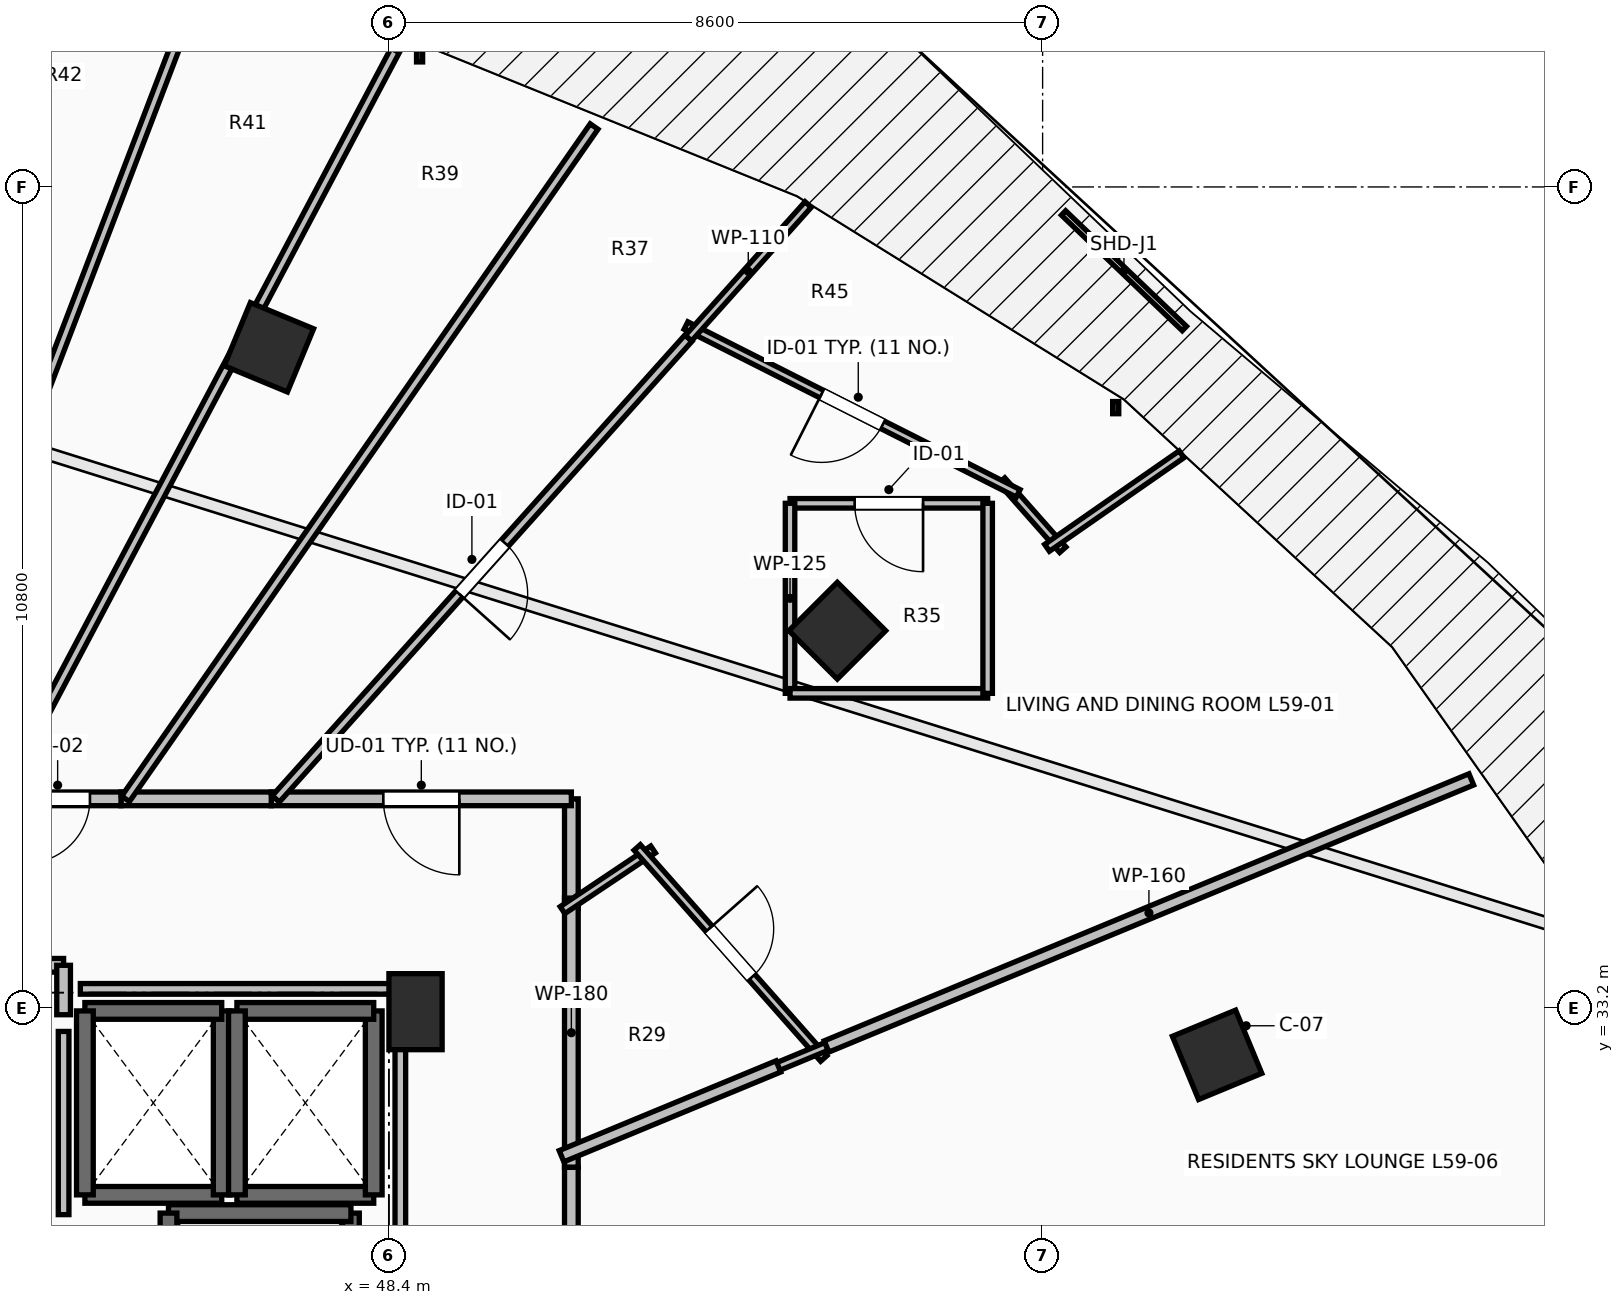
"""IFC4 building model, lengths in metres.
Left out: names, types, materials, properties, quantities, classifications, styles, units other than length and angle.
Written with IfcOpenShell. Run it as: python <this file> out.ifc"""

import sys

from ifc_helpers import new_model, si_unit, direction, frame, frame_2d, origin, origin_2d, place, context, subcontext, project, spatial, rectangle, extrude, element, fill, save


model = new_model("IFC4")
c1 = context("Model", 3, precision=1e-05, world=origin(), true_north=direction((0.0, 1.0)))
c2 = subcontext(c1, "Body", "Model", "MODEL_VIEW")
j1 = project(units=[si_unit("LENGTHUNIT", "METRE"), si_unit("PLANEANGLEUNIT", "RADIAN")], contexts=[c1])
p1 = place(None, origin())
s1 = spatial("IfcSite", under=j1, at=p1, CompositionType="ELEMENT")
p2 = place(p1, origin())
s2 = spatial("IfcBuilding", under=s1, at=p2, CompositionType="ELEMENT")
p3 = place(p2, frame((0.0, 0.0, 217.85)))
s3 = spatial("IfcBuildingStorey", under=s2, at=p3, CompositionType="ELEMENT", Elevation=217.85)
for number, where, z_axis, x_axis in (
    (1, (59.295, 32.582, 0.0), (0.0, 0.0, 1.0), (0.924, 0.383, 0.0)),
    (2, (54.299, 38.162, 0.0), (0.0, 0.0, 1.0), (0.707, 0.707, 0.0)),
    (3, (46.821, 41.891, 0.0), (0.0, 0.0, 1.0), (0.383, 0.924, 0.0)),
):
    element("IfcColumn", number, at=place(p3, frame(where, z_axis=z_axis, x_axis=x_axis)), inside=s3, PredefinedType="COLUMN", context=c2, shape_type="SweptSolid", body=[
        extrude(rectangle(XDim=0.9, YDim=0.9, at=origin_2d()), origin(), (0.0, 0.0, 1.0), 3.55),
    ])
p4 = place(p3, frame((48.75, 33.15, 0.0), z_axis=(0.0, 0.0, 1.0), x_axis=(1.0, 0.0, 0.0)))
e4 = element("IfcColumn", 4, at=p4, inside=s3, PredefinedType="PILASTER", context=c2, shape_type="SweptSolid", body=[
    extrude(rectangle(XDim=0.7, YDim=1.0, at=origin_2d()), origin(), (0.0, 0.0, 1.0), 3.55),
])
p5 = place(p3, frame((44.4, 30.74, 0.0), z_axis=(0.0, 0.0, 1.0), x_axis=(1.0, 0.0, 0.0)))
e5 = element("IfcWall", 5, at=p5, inside=s3, PredefinedType="SOLIDWALL", context=c2, shape_type="SweptSolid", body=[
    extrude(rectangle(XDim=1.8, YDim=0.22, at=frame_2d((0.9, 0.0))), origin(), (0.0, 0.0, 1.0), 3.29),
])
p6 = place(p3, frame((46.2, 30.74, 0.0), z_axis=(0.0, 0.0, 1.0), x_axis=(0.0, 1.0, 0.0)))
e6 = element("IfcWall", 6, at=p6, inside=s3, PredefinedType="SOLIDWALL", context=c2, shape_type="SweptSolid", body=[
    extrude(rectangle(XDim=2.42, YDim=0.22, at=frame_2d((1.21, 0.0))), origin(), (0.0, 0.0, 1.0), 3.29),
])
p7 = place(p3, frame((46.2, 33.16, 0.0), z_axis=(0.0, 0.0, 1.0), x_axis=(-1.0, 0.0, 0.0)))
e7 = element("IfcWall", 7, at=p7, inside=s3, PredefinedType="SOLIDWALL", context=c2, shape_type="SweptSolid", body=[
    extrude(rectangle(XDim=1.8, YDim=0.22, at=frame_2d((0.9, 0.0))), origin(), (0.0, 0.0, 1.0), 3.29),
])
p8 = place(p3, frame((44.4, 33.16, 0.0), z_axis=(0.0, 0.0, 1.0), x_axis=(0.0, -1.0, 0.0)))
e8 = element("IfcWall", 8, at=p8, inside=s3, PredefinedType="SOLIDWALL", context=c2, shape_type="SweptSolid", body=[
    extrude(rectangle(XDim=2.42, YDim=0.22, at=frame_2d((1.21, 0.0))), origin(), (0.0, 0.0, 1.0), 3.29),
])
p9 = place(p3, frame((46.4, 30.74, 0.0), z_axis=(0.0, 0.0, 1.0), x_axis=(1.0, 0.0, 0.0)))
e9 = element("IfcWall", 9, at=p9, inside=s3, PredefinedType="SOLIDWALL", context=c2, shape_type="SweptSolid", body=[
    extrude(rectangle(XDim=1.8, YDim=0.22, at=frame_2d((0.9, 0.0))), origin(), (0.0, 0.0, 1.0), 3.29),
])
p10 = place(p3, frame((48.2, 30.74, 0.0), z_axis=(0.0, 0.0, 1.0), x_axis=(0.0, 1.0, 0.0)))
e10 = element("IfcWall", 10, at=p10, inside=s3, PredefinedType="SOLIDWALL", context=c2, shape_type="SweptSolid", body=[
    extrude(rectangle(XDim=2.42, YDim=0.22, at=frame_2d((1.21, 0.0))), origin(), (0.0, 0.0, 1.0), 3.29),
])
p11 = place(p3, frame((48.2, 33.16, 0.0), z_axis=(0.0, 0.0, 1.0), x_axis=(-1.0, 0.0, 0.0)))
e11 = element("IfcWall", 11, at=p11, inside=s3, PredefinedType="SOLIDWALL", context=c2, shape_type="SweptSolid", body=[
    extrude(rectangle(XDim=1.8, YDim=0.22, at=frame_2d((0.9, 0.0))), origin(), (0.0, 0.0, 1.0), 3.29),
])
p12 = place(p3, frame((46.4, 33.16, 0.0), z_axis=(0.0, 0.0, 1.0), x_axis=(0.0, -1.0, 0.0)))
e12 = element("IfcWall", 12, at=p12, inside=s3, PredefinedType="SOLIDWALL", context=c2, shape_type="SweptSolid", body=[
    extrude(rectangle(XDim=2.42, YDim=0.22, at=frame_2d((1.21, 0.0))), origin(), (0.0, 0.0, 1.0), 3.29),
])
p13 = place(p3, frame((47.9, 28.0, 0.0), z_axis=(0.0, 0.0, 1.0), x_axis=(0.0, 1.0, 0.0)))
e13 = element("IfcWall", 13, at=p13, inside=s3, PredefinedType="SHEAR", context=c2, shape_type="SweptSolid", body=[
    extrude(rectangle(XDim=2.5, YDim=0.22, at=frame_2d((1.25, 0.0))), origin(), (0.0, 0.0, 1.0), 3.29),
])
p14 = place(p3, frame((47.9, 30.5, 0.0), z_axis=(0.0, 0.0, 1.0), x_axis=(-1.0, 0.0, 0.0)))
e14 = element("IfcWall", 14, at=p14, inside=s3, PredefinedType="SHEAR", context=c2, shape_type="SweptSolid", body=[
    extrude(rectangle(XDim=2.4, YDim=0.22, at=frame_2d((1.2, 0.0))), origin(), (0.0, 0.0, 1.0), 3.29),
])
p15 = place(p3, frame((45.5, 30.5, 0.0), z_axis=(0.0, 0.0, 1.0), x_axis=(0.0, -1.0, 0.0)))
e15 = element("IfcWall", 15, at=p15, inside=s3, PredefinedType="SHEAR", context=c2, shape_type="SweptSolid", body=[
    extrude(rectangle(XDim=2.5, YDim=0.22, at=frame_2d((1.25, 0.0))), origin(), (0.0, 0.0, 1.0), 3.29),
])
p16 = place(p3, frame((44.12, 33.76, 0.0), z_axis=(0.0, 0.0, 1.0), x_axis=(-1.0, 0.0, 0.0)))
e16 = element("IfcWall", 16, at=p16, inside=s3, PredefinedType="PARTITIONING", context=c2, shape_type="SweptSolid", body=[
    extrude(rectangle(XDim=2.53, YDim=0.18, at=frame_2d((1.265, 0.0))), origin(), (0.0, 0.0, 1.0), 3.29),
])
p17 = place(p16, frame((0.84, 0.0, 0.0)))
e17 = element("IfcOpeningElement", 17, at=p17, cuts=e16, PredefinedType="OPENING", context=c2, shape_type="SweptSolid", body=[
    extrude(rectangle(XDim=0.85, YDim=2.1, at=frame_2d((0.425, 1.05))), frame((0.0, 0.105, 0.0), z_axis=(0.0, -1.0, 0.0), x_axis=(1.0, 0.0, 0.0)), (0.0, 0.0, 1.0), 0.21),
])
p18 = place(p3, frame((44.12, 33.11, 0.0), z_axis=(0.0, 0.0, 1.0), x_axis=(0.0, 1.0, 0.0)))
e18 = element("IfcWall", 18, at=p18, inside=s3, PredefinedType="PARTITIONING", context=c2, shape_type="SweptSolid", body=[
    extrude(rectangle(XDim=0.65, YDim=0.18, at=frame_2d((0.325, 0.0))), origin(), (0.0, 0.0, 1.0), 3.29),
])
p19 = place(p3, frame((50.8, 34.504, 0.0), z_axis=(0.0, 0.0, 1.0), x_axis=(0.0, 1.0, 0.0)))
e19 = element("IfcWall", 19, at=p19, inside=s3, PredefinedType="PARTITIONING", context=c2, shape_type="SweptSolid", body=[
    extrude(rectangle(XDim=1.446, YDim=0.18, at=frame_2d((0.723, 0.0))), origin(), (0.0, 0.0, 1.0), 2.482),
])
p20 = place(p3, frame((50.8, 35.95, 0.0), z_axis=(0.0, 0.0, 1.0), x_axis=(-1.0, 0.0, 0.0)))
e20 = element("IfcWall", 20, at=p20, inside=s3, PredefinedType="PARTITIONING", context=c2, shape_type="SweptSolid", body=[
    extrude(rectangle(XDim=3.948, YDim=0.18, at=frame_2d((1.974, 0.0))), origin(), (0.0, 0.0, 1.0), 2.482),
])
p21 = place(p20, frame((1.474, 0.0, 0.0)))
e21 = element("IfcOpeningElement", 21, at=p21, cuts=e20, PredefinedType="OPENING", context=c2, shape_type="SweptSolid", body=[
    extrude(rectangle(XDim=1.0, YDim=2.15, at=frame_2d((0.5, 1.075))), frame((0.0, 0.105, 0.0), z_axis=(0.0, -1.0, 0.0), x_axis=(1.0, 0.0, 0.0)), (0.0, 0.0, 1.0), 0.21),
])
p22 = place(p3, frame((50.8, 31.102, 0.0), z_axis=(0.0, 0.0, 1.0), x_axis=(0.0, 1.0, 0.0)))
e22 = element("IfcWall", 22, at=p22, inside=s3, PredefinedType="PARTITIONING", context=c2, shape_type="SweptSolid", body=[
    extrude(rectangle(XDim=3.542, YDim=0.18, at=frame_2d((1.771, 0.0))), origin(), (0.0, 0.0, 1.0), 2.482),
])
p23 = place(p3, frame((46.852, 35.95, 0.0), z_axis=(0.0, 0.0, 1.0), x_axis=(-1.0, 0.0, 0.0)))
e23 = element("IfcWall", 23, at=p23, inside=s3, PredefinedType="PARTITIONING", context=c2, shape_type="SweptSolid", body=[
    extrude(rectangle(XDim=1.977, YDim=0.18, at=frame_2d((0.989, 0.0))), origin(), (0.0, 0.0, 1.0), 3.29),
])
p24 = place(p3, frame((44.875, 35.95, 0.0), z_axis=(0.0, 0.0, 1.0), x_axis=(-1.0, 0.0, 0.0)))
e24 = element("IfcWall", 24, at=p24, inside=s3, PredefinedType="PARTITIONING", context=c2, shape_type="SweptSolid", body=[
    extrude(rectangle(XDim=1.667, YDim=0.18, at=frame_2d((0.833, 0.0))), origin(), (0.0, 0.0, 1.0), 3.29),
])
p25 = place(p24, frame((0.408, 0.0, 0.0)))
e25 = element("IfcOpeningElement", 25, at=p25, cuts=e24, PredefinedType="OPENING", context=c2, shape_type="SweptSolid", body=[
    extrude(rectangle(XDim=0.85, YDim=2.1, at=frame_2d((0.425, 1.05))), frame((0.0, 0.105, 0.0), z_axis=(0.0, -1.0, 0.0), x_axis=(1.0, 0.0, 0.0)), (0.0, 0.0, 1.0), 0.21),
])
p26 = place(p3, frame((50.8, 27.25, 0.0), z_axis=(0.0, 0.0, 1.0), x_axis=(0.0, 1.0, 0.0)))
e26 = element("IfcWall", 26, at=p26, inside=s3, PredefinedType="PARTITIONING", context=c2, shape_type="SweptSolid", body=[
    extrude(rectangle(XDim=3.852, YDim=0.18, at=frame_2d((1.926, 0.0))), origin(), (0.0, 0.0, 1.0), 2.482),
])
p27 = place(p3, frame((50.684, 34.486, 0.0), z_axis=(0.0, 0.0, 1.0), x_axis=(0.830948636418, 0.556349138253, 0.0)))
e27 = element("IfcWall", 27, at=p27, inside=s3, PredefinedType="PARTITIONING", context=c2, shape_type="SweptSolid", body=[
    extrude(rectangle(XDim=1.434, YDim=0.11, at=frame_2d((0.717, 0.0))), origin(), (0.0, 0.0, 1.0), 2.924),
])
p28 = place(p3, frame((51.666, 35.311, 0.0), z_axis=(0.0, 0.0, 1.0), x_axis=(0.662288118602, -0.749249256228, 0.0)))
e28 = element("IfcWall", 28, at=p28, inside=s3, PredefinedType="PARTITIONING", context=c2, shape_type="SweptSolid", body=[
    extrude(rectangle(XDim=3.706, YDim=0.11, at=frame_2d((1.853, 0.0))), origin(), (0.0, 0.0, 1.0), 2.482),
])
p29 = place(p28, frame((1.428, 0.0, 0.0)))
e29 = element("IfcOpeningElement", 29, at=p29, cuts=e28, PredefinedType="OPENING", context=c2, shape_type="SweptSolid", body=[
    extrude(rectangle(XDim=0.85, YDim=2.1, at=frame_2d((0.425, 1.05))), frame((0.0, 0.07, 0.0), z_axis=(0.0, -1.0, 0.0), x_axis=(1.0, 0.0, 0.0)), (0.0, 0.0, 1.0), 0.14),
])
p30 = place(p3, frame((54.157, 32.693, 0.0), z_axis=(0.0, 0.0, 1.0), x_axis=(-0.923731903457, -0.383039646166, 0.0)))
e30 = element("IfcWall", 30, at=p30, inside=s3, PredefinedType="PARTITIONING", context=c2, shape_type="SweptSolid", body=[
    extrude(rectangle(XDim=0.825, YDim=0.11, at=frame_2d((0.413, 0.0))), origin(), (0.0, 0.0, 1.0), 2.482),
])
p31 = place(p3, frame((57.266, 39.227, 0.0), z_axis=(0.0, 0.0, 1.0), x_axis=(-0.662352650652, 0.749192209099, 0.0)))
e31 = element("IfcWall", 31, at=p31, inside=s3, PredefinedType="PARTITIONING", context=c2, shape_type="SweptSolid", body=[
    extrude(rectangle(XDim=1.215, YDim=0.11, at=frame_2d((0.607, 0.0))), origin(), (0.0, 0.0, 1.0), 3.29),
])
p32 = place(p3, frame((56.679, 39.969, 0.0), z_axis=(0.0, 0.0, 1.0), x_axis=(-0.892574903925, 0.450899147131, 0.0)))
e32 = element("IfcWall", 32, at=p32, inside=s3, PredefinedType="PARTITIONING", context=c2, shape_type="SweptSolid", body=[
    extrude(rectangle(XDim=4.897, YDim=0.11, at=frame_2d((2.448, 0.0))), origin(), (0.0, 0.0, 1.0), 3.29),
])
p33 = place(p32, frame((1.999, 0.0, 0.0)))
e33 = element("IfcOpeningElement", 33, at=p33, cuts=e32, PredefinedType="OPENING", context=c2, shape_type="SweptSolid", body=[
    extrude(rectangle(XDim=0.9, YDim=2.1, at=frame_2d((0.45, 1.05))), frame((0.0, 0.07, 0.0), z_axis=(0.0, -1.0, 0.0), x_axis=(1.0, 0.0, 0.0)), (0.0, 0.0, 1.0), 0.14),
])
p34 = place(p3, frame((52.34, 42.01, 0.0), z_axis=(0.0, 0.0, 1.0), x_axis=(0.667118090827, 0.744951980259, 0.0)))
e34 = element("IfcWall", 34, at=p34, inside=s3, PredefinedType="PARTITIONING", context=c2, shape_type="SweptSolid", body=[
    extrude(rectangle(XDim=2.362, YDim=0.11, at=frame_2d((1.181, 0.0))), origin(), (0.0, 0.0, 1.0), 3.29),
])
p35 = place(p3, frame((58.828, 40.483, 0.0), z_axis=(0.0, 0.0, 1.0), x_axis=(-0.820999835833, -0.570928427705, 0.0)))
e35 = element("IfcWall", 35, at=p35, inside=s3, PredefinedType="PARTITIONING", context=c2, shape_type="SweptSolid", body=[
    extrude(rectangle(XDim=2.156, YDim=0.11, at=frame_2d((1.078, 0.0))), origin(), (0.0, 0.0, 1.0), 3.29),
])
p36 = place(p3, frame((56.277, 39.838, 0.0), z_axis=(0.0, 0.0, 1.0), x_axis=(-1.0, 0.0, 0.0)))
e36 = element("IfcWall", 36, at=p36, inside=s3, PredefinedType="PARTITIONING", context=c2, shape_type="SweptSolid", body=[
    extrude(rectangle(XDim=2.6, YDim=0.125, at=frame_2d((1.3, 0.0))), origin(), (0.0, 0.0, 1.0), 3.29),
])
p37 = place(p36, frame((0.85, 0.0, 0.0)))
e37 = element("IfcOpeningElement", 37, at=p37, cuts=e36, PredefinedType="OPENING", context=c2, shape_type="SweptSolid", body=[
    extrude(rectangle(XDim=0.9, YDim=2.1, at=frame_2d((0.45, 1.05))), frame((0.0, 0.077, 0.0), z_axis=(0.0, -1.0, 0.0), x_axis=(1.0, 0.0, 0.0)), (0.0, 0.0, 1.0), 0.155),
])
p38 = place(p3, frame((53.677, 39.838, 0.0), z_axis=(0.0, 0.0, 1.0), x_axis=(0.0, -1.0, 0.0)))
e38 = element("IfcWall", 38, at=p38, inside=s3, PredefinedType="PARTITIONING", context=c2, shape_type="SweptSolid", body=[
    extrude(rectangle(XDim=2.5, YDim=0.125, at=frame_2d((1.25, 0.0))), origin(), (0.0, 0.0, 1.0), 2.482),
])
p39 = place(p3, frame((53.677, 37.338, 0.0), z_axis=(0.0, 0.0, 1.0), x_axis=(1.0, 0.0, 0.0)))
e39 = element("IfcWall", 39, at=p39, inside=s3, PredefinedType="PARTITIONING", context=c2, shape_type="SweptSolid", body=[
    extrude(rectangle(XDim=2.6, YDim=0.125, at=frame_2d((1.3, 0.0))), origin(), (0.0, 0.0, 1.0), 2.482),
])
p40 = place(p3, frame((56.277, 37.338, 0.0), z_axis=(0.0, 0.0, 1.0), x_axis=(0.0, 1.0, 0.0)))
e40 = element("IfcWall", 40, at=p40, inside=s3, PredefinedType="PARTITIONING", context=c2, shape_type="SweptSolid", body=[
    extrude(rectangle(XDim=2.5, YDim=0.125, at=frame_2d((1.25, 0.0))), origin(), (0.0, 0.0, 1.0), 3.29),
])
p41 = place(p3, frame((52.34, 42.01, 0.0), z_axis=(0.0, 0.0, 1.0), x_axis=(-0.667173742476, -0.744902139445, 0.0)))
e41 = element("IfcWall", 41, at=p41, inside=s3, PredefinedType="PARTITIONING", context=c2, shape_type="SweptSolid", body=[
    extrude(rectangle(XDim=8.135, YDim=0.125, at=frame_2d((4.067, 0.0))), origin(), (0.0, 0.0, 1.0), 2.482),
])
p42 = place(p41, frame((3.617, 0.0, 0.0)))
e42 = element("IfcOpeningElement", 42, at=p42, cuts=e41, PredefinedType="OPENING", context=c2, shape_type="SweptSolid", body=[
    extrude(rectangle(XDim=0.9, YDim=2.1, at=frame_2d((0.45, 1.05))), frame((0.0, 0.077, 0.0), z_axis=(0.0, -1.0, 0.0), x_axis=(1.0, 0.0, 0.0)), (0.0, 0.0, 1.0), 0.155),
])
p43 = place(p3, frame((54.157, 32.692, 0.0), z_axis=(0.0, 0.0, 1.0), x_axis=(0.923874230192, 0.382696233045, 0.0)))
e43 = element("IfcWall", 43, at=p43, inside=s3, PredefinedType="PARTITIONING", context=c2, shape_type="SweptSolid", body=[
    extrude(rectangle(XDim=9.181, YDim=0.16, at=frame_2d((4.591, 0.0))), origin(), (0.0, 0.0, 1.0), 2.482),
])
p44 = place(p3, frame((50.671, 31.248, 0.0), z_axis=(0.0, 0.0, 1.0), x_axis=(0.923905073908, 0.382621764158, 0.0)))
e44 = element("IfcWall", 44, at=p44, inside=s3, PredefinedType="PARTITIONING", context=c2, shape_type="SweptSolid", body=[
    extrude(rectangle(XDim=3.088, YDim=0.16, at=frame_2d((1.544, 0.0))), origin(), (0.0, 0.0, 1.0), 2.924),
])
p45 = place(p3, frame((51.099, 44.795, 0.0), z_axis=(0.0, 0.0, 1.0), x_axis=(-0.571754326018, -0.82042488424, 0.0)))
e45 = element("IfcWall", 45, at=p45, inside=s3, PredefinedType="PARTITIONING", context=c2, shape_type="SweptSolid", body=[
    extrude(rectangle(XDim=10.781, YDim=0.125, at=frame_2d((5.391, 0.0))), origin(), (0.0, 0.0, 1.0), 2.482),
])
p46 = place(p3, frame((48.482, 45.797, 0.0), z_axis=(0.0, 0.0, 1.0), x_axis=(-0.46793402924, -0.883763398359, 0.0)))
e46 = element("IfcWall", 46, at=p46, inside=s3, PredefinedType="PARTITIONING", context=c2, shape_type="SweptSolid", body=[
    extrude(rectangle(XDim=11.142, YDim=0.125, at=frame_2d((5.571, 0.0))), origin(), (0.0, 0.0, 1.0), 2.824),
])
p47 = place(p3, frame((45.805, 46.412, 0.0), z_axis=(0.0, 0.0, 1.0), x_axis=(-0.357119008819, -0.934058891901, 0.0)))
e47 = element("IfcWall", 47, at=p47, inside=s3, PredefinedType="PARTITIONING", context=c2, shape_type="SweptSolid", body=[
    extrude(rectangle(XDim=11.201, YDim=0.125, at=frame_2d((5.6, 0.0))), origin(), (0.0, 0.0, 1.0), 2.824),
])
p48 = place(p3, frame((44.12, 30.48, 0.0), z_axis=(0.0, 0.0, 1.0), x_axis=(0.0, 1.0, 0.0)))
e48 = element("IfcWall", 48, at=p48, inside=s3, PredefinedType="PARTITIONING", context=c2, shape_type="SweptSolid", body=[
    extrude(rectangle(XDim=2.41, YDim=0.14, at=frame_2d((1.205, 0.0))), origin(), (0.0, 0.0, 1.0), 3.29),
])
p49 = place(p3, frame((48.55, 28.196, 0.0), z_axis=(0.0, 0.0, 1.0), x_axis=(0.0, 1.0, 0.0)))
e49 = element("IfcWall", 49, at=p49, inside=s3, PredefinedType="PARTITIONING", context=c2, shape_type="SweptSolid", body=[
    extrude(rectangle(XDim=5.254, YDim=0.14, at=frame_2d((2.627, 0.0))), origin(), (0.0, 0.0, 1.0), 2.482),
])
p50 = place(p3, frame((48.55, 33.45, 0.0), z_axis=(0.0, 0.0, 1.0), x_axis=(-1.0, 0.0, 0.0)))
e50 = element("IfcWall", 50, at=p50, inside=s3, PredefinedType="PARTITIONING", context=c2, shape_type="SweptSolid", body=[
    extrude(rectangle(XDim=4.21, YDim=0.14, at=frame_2d((2.105, 0.0))), origin(), (0.0, 0.0, 1.0), 2.482),
])
p51 = place(p21, origin())
e51 = element("IfcDoor", 51, at=p51, inside=s3, OperationType="SINGLE_SWING_LEFT", PredefinedType="DOOR", context=c2, shape_type="SweptSolid", body=[
    extrude(rectangle(XDim=1.0, YDim=2.15, at=frame_2d((0.5, 1.075))), frame((0.0, 0.025, 0.0), z_axis=(0.0, -1.0, 0.0), x_axis=(1.0, 0.0, 0.0)), (0.0, 0.0, 1.0), 0.05),
])
fill(e21, e51)
p52 = place(p29, origin())
e52 = element("IfcDoor", 52, at=p52, inside=s3, OperationType="SINGLE_SWING_LEFT", PredefinedType="DOOR", context=c2, shape_type="SweptSolid", body=[
    extrude(rectangle(XDim=0.85, YDim=2.1, at=frame_2d((0.425, 1.05))), frame((0.0, 0.025, 0.0), z_axis=(0.0, -1.0, 0.0), x_axis=(1.0, 0.0, 0.0)), (0.0, 0.0, 1.0), 0.05),
])
fill(e29, e52)
p53 = place(p33, origin())
e53 = element("IfcDoor", 53, at=p53, inside=s3, OperationType="SINGLE_SWING_RIGHT", PredefinedType="DOOR", context=c2, shape_type="SweptSolid", body=[
    extrude(rectangle(XDim=0.9, YDim=2.1, at=frame_2d((0.45, 1.05))), frame((0.0, 0.025, 0.0), z_axis=(0.0, -1.0, 0.0), x_axis=(1.0, 0.0, 0.0)), (0.0, 0.0, 1.0), 0.05),
])
fill(e33, e53)
p54 = place(p37, origin())
e54 = element("IfcDoor", 54, at=p54, inside=s3, OperationType="SINGLE_SWING_LEFT", PredefinedType="DOOR", context=c2, shape_type="SweptSolid", body=[
    extrude(rectangle(XDim=0.9, YDim=2.1, at=frame_2d((0.45, 1.05))), frame((0.0, 0.025, 0.0), z_axis=(0.0, -1.0, 0.0), x_axis=(1.0, 0.0, 0.0)), (0.0, 0.0, 1.0), 0.05),
])
fill(e37, e54)
p55 = place(p42, origin())
e55 = element("IfcDoor", 55, at=p55, inside=s3, OperationType="SINGLE_SWING_RIGHT", PredefinedType="DOOR", context=c2, shape_type="SweptSolid", body=[
    extrude(rectangle(XDim=0.9, YDim=2.1, at=frame_2d((0.45, 1.05))), frame((0.0, 0.025, 0.0), z_axis=(0.0, -1.0, 0.0), x_axis=(1.0, 0.0, 0.0)), (0.0, 0.0, 1.0), 0.05),
])
fill(e42, e55)
p56 = place(p25, origin())
e56 = element("IfcDoor", 56, at=p56, inside=s3, OperationType="SINGLE_SWING_RIGHT", PredefinedType="DOOR", context=c2, shape_type="SweptSolid", body=[
    extrude(rectangle(XDim=0.85, YDim=2.1, at=frame_2d((0.425, 1.05))), frame((0.0, 0.025, 0.0), z_axis=(0.0, -1.0, 0.0), x_axis=(1.0, 0.0, 0.0)), (0.0, 0.0, 1.0), 0.05),
])
fill(e25, e56)
save(model, sys.argv[1])
